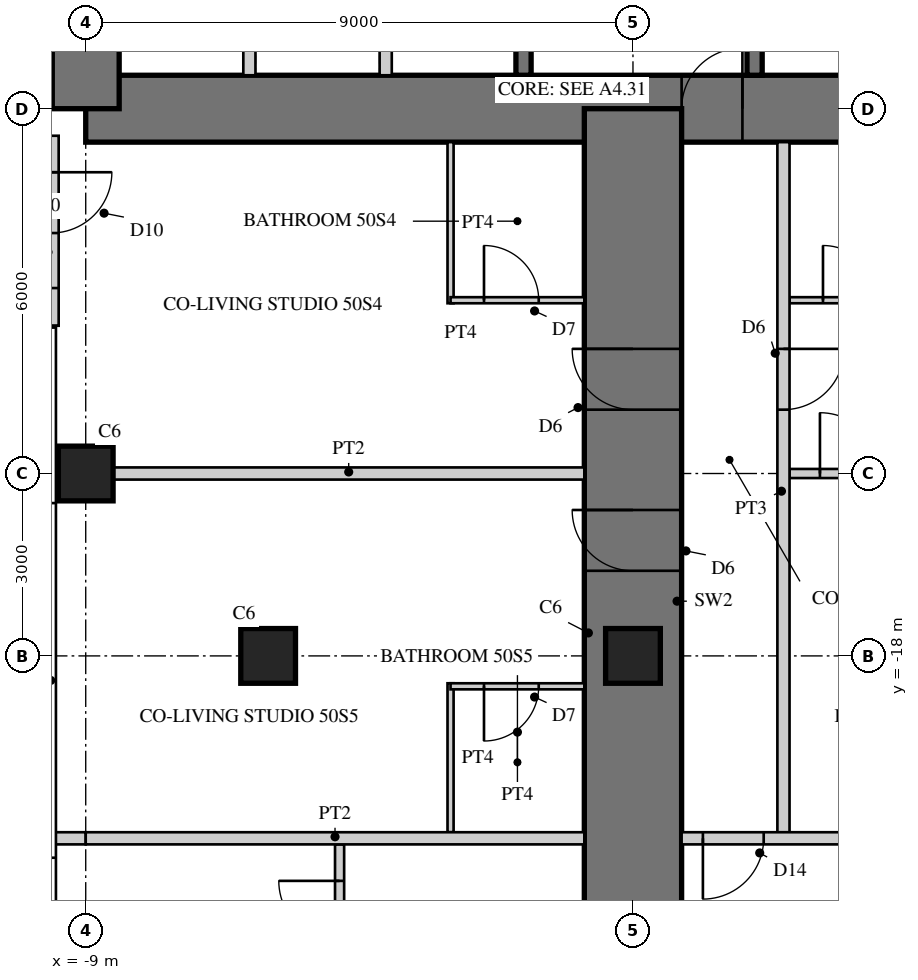
"""IFC4 building model, lengths in metres.
Left out: names, types, materials, properties, quantities, classifications, styles, units other than length and angle.
Written with IfcOpenShell. Run it as: python <this file> out.ifc"""

import sys

from ifc_helpers import new_model, si_unit, direction, frame, frame_2d, origin, origin_2d, place, context, subcontext, project, spatial, rectangle, hollow_rectangle, extrude, element, fill, save


model = new_model("IFC4")
c1 = context("Model", 3, precision=1e-05, world=origin(), true_north=direction((0.0, 1.0)))
c2 = subcontext(c1, "Body", "Model", "MODEL_VIEW")
j1 = project(units=[si_unit("LENGTHUNIT", "METRE"), si_unit("PLANEANGLEUNIT", "RADIAN")], contexts=[c1])
p1 = place(None, origin())
s1 = spatial("IfcSite", under=j1, at=p1, CompositionType="ELEMENT")
p2 = place(p1, origin())
s2 = spatial("IfcBuilding", under=s1, at=p2, CompositionType="ELEMENT")
p3 = place(p2, frame((0.0, 0.0, 200.1)))
s3 = spatial("IfcBuildingStorey", under=s2, at=p3, CompositionType="ELEMENT", Elevation=200.1)
p4 = place(p3, frame((-9.0, -9.0, 0.0), z_axis=(0.0, 0.0, 1.0), x_axis=(1.0, 0.0, 0.0)))
e1 = element("IfcWall", 1, at=p4, inside=s3, PredefinedType="SHEAR", context=c2, shape_type="SweptSolid", body=[
    extrude(rectangle(XDim=18.0, YDim=1.1, at=frame_2d((9.0, 0.0))), origin(), (0.0, 0.0, 1.0), 3.4),
])
p5 = place(p4, frame((9.8, 0.0, 0.0)))
e2 = element("IfcOpeningElement", 2, at=p5, cuts=e1, PredefinedType="OPENING", context=c2, shape_type="SweptSolid", body=[
    extrude(rectangle(XDim=1.0, YDim=2.4, at=frame_2d((0.5, 1.2))), frame((0.0, 0.56, 0.0), z_axis=(0.0, -1.0, 0.0), x_axis=(1.0, 0.0, 0.0)), (0.0, 0.0, 1.0), 1.12),
])
p6 = place(p3, frame((-9.0, 9.0, 0.0), z_axis=(0.0, 0.0, 1.0), x_axis=(0.0, -1.0, 0.0)))
e3 = element("IfcWall", 3, at=p6, inside=s3, PredefinedType="SHEAR", context=c2, shape_type="SweptSolid", body=[
    extrude(rectangle(XDim=18.0, YDim=1.1, at=frame_2d((9.0, 0.0))), origin(), (0.0, 0.0, 1.0), 3.4),
])
p7 = place(p6, frame((9.8, 0.0, 0.0)))
e4 = element("IfcOpeningElement", 4, at=p7, cuts=e3, PredefinedType="OPENING", context=c2, shape_type="SweptSolid", body=[
    extrude(rectangle(XDim=1.0, YDim=2.4, at=frame_2d((0.5, 1.2))), frame((0.0, 0.56, 0.0), z_axis=(0.0, -1.0, 0.0), x_axis=(1.0, 0.0, 0.0)), (0.0, 0.0, 1.0), 1.12),
])
p8 = place(p3, frame((-1.8, -1.875, 0.0), z_axis=(0.0, 0.0, 1.0), x_axis=(0.0, -1.0, 0.0)))
e5 = element("IfcWall", 5, at=p8, inside=s3, PredefinedType="SHEAR", context=c2, shape_type="SweptSolid", body=[
    extrude(rectangle(XDim=6.575, YDim=0.25, at=frame_2d((3.288, 0.0))), origin(), (0.0, 0.0, 1.0), 3.4),
])
p9 = place(p8, frame((1.875, 0.0, 0.0)))
e6 = element("IfcOpeningElement", 6, at=p9, cuts=e5, PredefinedType="OPENING", context=c2, shape_type="SweptSolid", body=[
    extrude(rectangle(XDim=1.6, YDim=2.4, at=frame_2d((0.8, 1.2))), frame((0.0, 0.135, 0.0), z_axis=(0.0, -1.0, 0.0), x_axis=(1.0, 0.0, 0.0)), (0.0, 0.0, 1.0), 0.27),
])
for number, where, z_axis, x_axis in (
    (7, (-4.067, -5.975, 0.0), (0.0, 0.0, 1.0), (0.0, -1.0, 0.0)),
    (8, (-6.308, -5.975, 0.0), (0.0, 0.0, 1.0), (0.0, -1.0, 0.0)),
):
    element("IfcWall", number, at=place(p3, frame(where, z_axis=z_axis, x_axis=x_axis)), inside=s3, PredefinedType="PARTITIONING", context=c2, shape_type="SweptSolid", body=[
        extrude(rectangle(XDim=2.475, YDim=0.2, at=frame_2d((1.237, 0.0))), origin(), (0.0, 0.0, 1.0), 3.4),
    ])
p10 = place(p3, frame((2.0, -1.675, 0.0), z_axis=(0.0, 0.0, 1.0), x_axis=(0.0, -1.0, 0.0)))
e9 = element("IfcWall", 9, at=p10, inside=s3, PredefinedType="SHEAR", context=c2, shape_type="SweptSolid", body=[
    extrude(rectangle(XDim=6.775, YDim=0.25, at=frame_2d((3.387, 0.0))), origin(), (0.0, 0.0, 1.0), 3.4),
])
p11 = place(p10, frame((0.725, 0.0, 0.0)))
e10 = element("IfcOpeningElement", 10, at=p11, cuts=e9, PredefinedType="OPENING", context=c2, shape_type="SweptSolid", body=[
    extrude(rectangle(XDim=1.0, YDim=2.1, at=frame_2d((0.5, 1.05))), frame((0.0, 0.135, 0.0), z_axis=(0.0, -1.0, 0.0), x_axis=(1.0, 0.0, 0.0)), (0.0, 0.0, 1.0), 0.27),
])
p12 = place(p3, frame((0.0, -9.0, 0.0), z_axis=(0.0, 0.0, 1.0), x_axis=(0.0, -1.0, 0.0)))
e11 = element("IfcWall", 11, at=p12, inside=s3, PredefinedType="SHEAR", context=c2, shape_type="SweptSolid", body=[
    extrude(rectangle(XDim=18.0, YDim=1.6, at=frame_2d((9.0, 0.0))), origin(), (0.0, 0.0, 1.0), 3.4),
])
p13 = place(p12, frame((3.95, 0.0, 0.0)))
e12 = element("IfcOpeningElement", 12, at=p13, cuts=e11, PredefinedType="OPENING", context=c2, shape_type="SweptSolid", body=[
    extrude(rectangle(XDim=1.0, YDim=2.15, at=frame_2d((0.5, 1.075))), frame((0.0, 0.81, 0.0), z_axis=(0.0, -1.0, 0.0), x_axis=(1.0, 0.0, 0.0)), (0.0, 0.0, 1.0), 1.62),
])
p14 = place(p12, frame((6.6, 0.0, 0.0)))
e13 = element("IfcOpeningElement", 13, at=p14, cuts=e11, PredefinedType="OPENING", context=c2, shape_type="SweptSolid", body=[
    extrude(rectangle(XDim=1.0, YDim=2.15, at=frame_2d((0.5, 1.075))), frame((0.0, 0.81, 0.0), z_axis=(0.0, -1.0, 0.0), x_axis=(1.0, 0.0, 0.0)), (0.0, 0.0, 1.0), 1.62),
])
p15 = place(p12, frame((13.25, 0.0, 0.0)))
e14 = element("IfcOpeningElement", 14, at=p15, cuts=e11, PredefinedType="OPENING", context=c2, shape_type="SweptSolid", body=[
    extrude(rectangle(XDim=1.0, YDim=2.2, at=frame_2d((0.5, 1.1))), frame((0.0, 0.81, 0.0), z_axis=(0.0, -1.0, 0.0), x_axis=(1.0, 0.0, 0.0)), (0.0, 0.0, 1.0), 1.62),
])
for number, where, z_axis, x_axis in (
    (15, (-9.0, -15.0, 0.0), (0.0, 0.0, 1.0), (1.0, 0.0, 0.0)),
    (16, (-6.0, -18.0, 0.0), (0.0, 0.0, 1.0), (1.0, 0.0, 0.0)),
    (17, (0.0, -18.0, 0.0), (0.0, 0.0, 1.0), (1.0, 0.0, 0.0)),
):
    element("IfcColumn", number, at=place(p3, frame(where, z_axis=z_axis, x_axis=x_axis)), inside=s3, PredefinedType="COLUMN", context=c2, shape_type="SweptSolid", body=[
        extrude(rectangle(XDim=0.9, YDim=0.9, at=origin_2d()), origin(), (0.0, 0.0, 1.0), 3.4),
    ])
p16 = place(p3, frame((-9.57, -9.445, 0.0), z_axis=(0.0, 0.0, 1.0), x_axis=(0.0, -1.0, 0.0)))
e18 = element("IfcWall", 18, at=p16, inside=s3, PredefinedType="SOLIDWALL", context=c2, shape_type="SweptSolid", body=[
    extrude(rectangle(XDim=3.125, YDim=0.25, at=frame_2d((1.562, 0.0))), origin(), (0.0, 0.0, 1.0), 3.22),
])
p17 = place(p16, frame((0.6, 0.0, 0.0)))
e19 = element("IfcOpeningElement", 19, at=p17, cuts=e18, PredefinedType="OPENING", context=c2, shape_type="SweptSolid", body=[
    extrude(rectangle(XDim=1.0, YDim=2.2, at=frame_2d((0.5, 1.1))), frame((0.0, 0.135, 0.0), z_axis=(0.0, -1.0, 0.0), x_axis=(1.0, 0.0, 0.0)), (0.0, 0.0, 1.0), 0.27),
])
p18 = place(p3, frame((2.575, -12.15, 0.0), z_axis=(0.0, 0.0, 1.0), x_axis=(1.0, 0.0, 0.0)))
e20 = element("IfcWall", 20, at=p18, inside=s3, PredefinedType="PARTITIONING", context=c2, shape_type="SweptSolid", body=[
    extrude(rectangle(XDim=2.2, YDim=0.1, at=frame_2d((1.1, 0.0))), origin(), (0.0, 0.0, 1.0), 3.22),
])
p19 = place(p18, frame((0.55, 0.0, 0.0)))
e21 = element("IfcOpeningElement", 21, at=p19, cuts=e20, PredefinedType="OPENING", context=c2, shape_type="SweptSolid", body=[
    extrude(rectangle(XDim=0.9, YDim=2.1, at=frame_2d((0.45, 1.05))), frame((0.0, 0.06, 0.0), z_axis=(0.0, -1.0, 0.0), x_axis=(1.0, 0.0, 0.0)), (0.0, 0.0, 1.0), 0.12),
])
p20 = place(p3, frame((2.575, -15.0, 0.0), z_axis=(0.0, 0.0, 1.0), x_axis=(1.0, 0.0, 0.0)))
e22 = element("IfcWall", 22, at=p20, inside=s3, PredefinedType="PARTITIONING", context=c2, shape_type="SweptSolid", body=[
    extrude(rectangle(XDim=5.975, YDim=0.15, at=frame_2d((2.988, 0.0))), origin(), (0.0, 0.0, 1.0), 2.47),
])
p21 = place(p20, frame((0.5, 0.0, 0.0)))
e23 = element("IfcOpeningElement", 23, at=p21, cuts=e22, PredefinedType="OPENING", context=c2, shape_type="SweptSolid", body=[
    extrude(rectangle(XDim=1.0, YDim=2.1, at=frame_2d((0.5, 1.05))), frame((0.0, 0.085, 0.0), z_axis=(0.0, -1.0, 0.0), x_axis=(1.0, 0.0, 0.0)), (0.0, 0.0, 1.0), 0.17),
])
p22 = place(p3, frame((-3.0, -9.55, 0.0), z_axis=(0.0, 0.0, 1.0), x_axis=(0.0, -1.0, 0.0)))
e24 = element("IfcWall", 24, at=p22, inside=s3, PredefinedType="PARTITIONING", context=c2, shape_type="SweptSolid", body=[
    extrude(rectangle(XDim=2.65, YDim=0.1, at=frame_2d((1.325, 0.0))), origin(), (0.0, 0.0, 1.0), 3.22),
])
p23 = place(p3, frame((-3.0, -12.15, 0.0), z_axis=(0.0, 0.0, 1.0), x_axis=(1.0, 0.0, 0.0)))
e25 = element("IfcWall", 25, at=p23, inside=s3, PredefinedType="PARTITIONING", context=c2, shape_type="SweptSolid", body=[
    extrude(rectangle(XDim=2.2, YDim=0.1, at=frame_2d((1.1, 0.0))), origin(), (0.0, 0.0, 1.0), 3.22),
])
p24 = place(p23, frame((0.55, 0.0, 0.0)))
e26 = element("IfcOpeningElement", 26, at=p24, cuts=e25, PredefinedType="OPENING", context=c2, shape_type="SweptSolid", body=[
    extrude(rectangle(XDim=0.9, YDim=2.1, at=frame_2d((0.45, 1.05))), frame((0.0, 0.06, 0.0), z_axis=(0.0, -1.0, 0.0), x_axis=(1.0, 0.0, 0.0)), (0.0, 0.0, 1.0), 0.12),
])
p25 = place(p3, frame((-8.55, -15.0, 0.0), z_axis=(0.0, 0.0, 1.0), x_axis=(1.0, 0.0, 0.0)))
e27 = element("IfcWall", 27, at=p25, inside=s3, PredefinedType="SOLIDWALL", context=c2, shape_type="SweptSolid", body=[
    extrude(rectangle(XDim=7.75, YDim=0.2, at=frame_2d((3.875, 0.0))), origin(), (0.0, 0.0, 1.0), 2.47),
])
p26 = place(p3, frame((-3.0, -18.45, 0.0), z_axis=(0.0, 0.0, 1.0), x_axis=(0.0, -1.0, 0.0)))
e28 = element("IfcWall", 28, at=p26, inside=s3, PredefinedType="PARTITIONING", context=c2, shape_type="SweptSolid", body=[
    extrude(rectangle(XDim=2.45, YDim=0.1, at=frame_2d((1.225, 0.0))), origin(), (0.0, 0.0, 1.0), 3.22),
])
p27 = place(p3, frame((-3.0, -18.5, 0.0), z_axis=(0.0, 0.0, 1.0), x_axis=(1.0, 0.0, 0.0)))
e29 = element("IfcWall", 29, at=p27, inside=s3, PredefinedType="PARTITIONING", context=c2, shape_type="SweptSolid", body=[
    extrude(rectangle(XDim=2.2, YDim=0.1, at=frame_2d((1.1, 0.0))), origin(), (0.0, 0.0, 1.0), 3.22),
])
p28 = place(p27, frame((0.55, 0.0, 0.0)))
e30 = element("IfcOpeningElement", 30, at=p28, cuts=e29, PredefinedType="OPENING", context=c2, shape_type="SweptSolid", body=[
    extrude(rectangle(XDim=0.9, YDim=2.1, at=frame_2d((0.45, 1.05))), frame((0.0, 0.06, 0.0), z_axis=(0.0, -1.0, 0.0), x_axis=(1.0, 0.0, 0.0)), (0.0, 0.0, 1.0), 0.12),
])
p29 = place(p3, frame((2.475, -9.55, 0.0), z_axis=(0.0, 0.0, 1.0), x_axis=(0.0, -1.0, 0.0)))
e31 = element("IfcWall", 31, at=p29, inside=s3, PredefinedType="SOLIDWALL", context=c2, shape_type="SweptSolid", body=[
    extrude(rectangle(XDim=11.45, YDim=0.2, at=frame_2d((5.725, 0.0))), origin(), (0.0, 0.0, 1.0), 3.22),
])
p30 = place(p29, frame((3.4, 0.0, 0.0)))
e32 = element("IfcOpeningElement", 32, at=p30, cuts=e31, PredefinedType="OPENING", context=c2, shape_type="SweptSolid", body=[
    extrude(rectangle(XDim=1.0, YDim=2.15, at=frame_2d((0.5, 1.075))), frame((0.0, 0.11, 0.0), z_axis=(0.0, -1.0, 0.0), x_axis=(1.0, 0.0, 0.0)), (0.0, 0.0, 1.0), 0.22),
])
p31 = place(p3, frame((-4.825, -21.1, 0.0), z_axis=(0.0, 0.0, 1.0), x_axis=(0.0, -1.0, 0.0)))
e33 = element("IfcWall", 33, at=p31, inside=s3, PredefinedType="PARTITIONING", context=c2, shape_type="SweptSolid", body=[
    extrude(rectangle(XDim=5.45, YDim=0.15, at=frame_2d((2.725, 0.0))), origin(), (0.0, 0.0, 1.0), 3.22),
])
p32 = place(p31, frame((0.6, 0.0, 0.0)))
e34 = element("IfcOpeningElement", 34, at=p32, cuts=e33, PredefinedType="OPENING", context=c2, shape_type="SweptSolid", body=[
    extrude(rectangle(XDim=1.0, YDim=2.1, at=frame_2d((0.5, 1.05))), frame((0.0, 0.085, 0.0), z_axis=(0.0, -1.0, 0.0), x_axis=(1.0, 0.0, 0.0)), (0.0, 0.0, 1.0), 0.17),
])
p33 = place(p3, frame((-9.53, -21.0, 0.0), z_axis=(0.0, 0.0, 1.0), x_axis=(1.0, 0.0, 0.0)))
e35 = element("IfcWall", 35, at=p33, inside=s3, PredefinedType="SOLIDWALL", context=c2, shape_type="SweptSolid", body=[
    extrude(rectangle(XDim=0.53, YDim=0.2, at=frame_2d((0.265, 0.0))), origin(), (0.0, 0.0, 1.0), 3.22),
])
p34 = place(p3, frame((-9.0, -21.0, 0.0), z_axis=(0.0, 0.0, 1.0), x_axis=(1.0, 0.0, 0.0)))
e36 = element("IfcWall", 36, at=p34, inside=s3, PredefinedType="SOLIDWALL", context=c2, shape_type="SweptSolid", body=[
    extrude(rectangle(XDim=8.2, YDim=0.2, at=frame_2d((4.1, 0.0))), origin(), (0.0, 0.0, 1.0), 2.62),
])
p35 = place(p3, frame((0.8, -21.0, 0.0), z_axis=(0.0, 0.0, 1.0), x_axis=(1.0, 0.0, 0.0)))
e37 = element("IfcWall", 37, at=p35, inside=s3, PredefinedType="SOLIDWALL", context=c2, shape_type="SweptSolid", body=[
    extrude(rectangle(XDim=8.2, YDim=0.2, at=frame_2d((4.1, 0.0))), origin(), (0.0, 0.0, 1.0), 2.62),
])
p36 = place(p35, frame((0.35, 0.0, 0.0)))
e38 = element("IfcOpeningElement", 38, at=p36, cuts=e37, PredefinedType="OPENING", context=c2, shape_type="SweptSolid", body=[
    extrude(rectangle(XDim=1.0, YDim=2.2, at=frame_2d((0.5, 1.1))), frame((0.0, 0.11, 0.0), z_axis=(0.0, -1.0, 0.0), x_axis=(1.0, 0.0, 0.0)), (0.0, 0.0, 1.0), 0.22),
])
p37 = place(p17, origin())
e39 = element("IfcDoor", 39, at=p37, inside=s3, OperationType="SINGLE_SWING_LEFT", PredefinedType="DOOR", context=c2, shape_type="SweptSolid", body=[
    extrude(hollow_rectangle(XDim=1.0, YDim=2.2, WallThickness=0.06, at=frame_2d((0.5, 1.1))), frame((0.0, 0.025, 0.0), z_axis=(0.0, -1.0, 0.0), x_axis=(1.0, 0.0, 0.0)), (0.0, 0.0, 1.0), 0.05),
    extrude(rectangle(XDim=0.879, YDim=2.079, at=frame_2d((0.5, 1.1))), frame((0.0, 0.025, 0.0), z_axis=(0.0, -1.0, 0.0), x_axis=(1.0, 0.0, 0.0)), (0.0, 0.0, 1.0), 0.05),
])
fill(e19, e39)
p38 = place(p19, origin())
e40 = element("IfcDoor", 40, at=p38, inside=s3, OperationType="SINGLE_SWING_LEFT", PredefinedType="DOOR", context=c2, shape_type="SweptSolid", body=[
    extrude(rectangle(XDim=0.9, YDim=2.1, at=frame_2d((0.45, 1.05))), frame((0.0, 0.025, 0.0), z_axis=(0.0, -1.0, 0.0), x_axis=(1.0, 0.0, 0.0)), (0.0, 0.0, 1.0), 0.05),
])
fill(e21, e40)
p39 = place(p21, origin())
e41 = element("IfcDoor", 41, at=p39, inside=s3, OperationType="SINGLE_SWING_LEFT", PredefinedType="DOOR", context=c2, shape_type="SweptSolid", body=[
    extrude(rectangle(XDim=1.0, YDim=2.1, at=frame_2d((0.5, 1.05))), frame((0.0, 0.025, 0.0), z_axis=(0.0, -1.0, 0.0), x_axis=(1.0, 0.0, 0.0)), (0.0, 0.0, 1.0), 0.05),
])
fill(e23, e41)
p40 = place(p24, origin())
e42 = element("IfcDoor", 42, at=p40, inside=s3, OperationType="SINGLE_SWING_LEFT", PredefinedType="DOOR", context=c2, shape_type="SweptSolid", body=[
    extrude(rectangle(XDim=0.9, YDim=2.1, at=frame_2d((0.45, 1.05))), frame((0.0, 0.025, 0.0), z_axis=(0.0, -1.0, 0.0), x_axis=(1.0, 0.0, 0.0)), (0.0, 0.0, 1.0), 0.05),
])
fill(e26, e42)
p41 = place(p28, frame((0.9, 0.0, 0.0), z_axis=(0.0, 0.0, 1.0), x_axis=(-1.0, 0.0, 0.0)))
e43 = element("IfcDoor", 43, at=p41, inside=s3, OperationType="SINGLE_SWING_RIGHT", PredefinedType="DOOR", context=c2, shape_type="SweptSolid", body=[
    extrude(rectangle(XDim=0.9, YDim=2.1, at=frame_2d((0.45, 1.05))), frame((0.0, 0.025, 0.0), z_axis=(0.0, -1.0, 0.0), x_axis=(1.0, 0.0, 0.0)), (0.0, 0.0, 1.0), 0.05),
])
fill(e30, e43)
p42 = place(p30, origin())
e44 = element("IfcDoor", 44, at=p42, inside=s3, OperationType="SINGLE_SWING_LEFT", PredefinedType="DOOR", context=c2, shape_type="SweptSolid", body=[
    extrude(rectangle(XDim=1.0, YDim=2.15, at=frame_2d((0.5, 1.075))), frame((0.0, 0.025, 0.0), z_axis=(0.0, -1.0, 0.0), x_axis=(1.0, 0.0, 0.0)), (0.0, 0.0, 1.0), 0.05),
])
fill(e32, e44)
p43 = place(p32, frame((1.0, 0.0, 0.0), z_axis=(0.0, 0.0, 1.0), x_axis=(-1.0, 0.0, 0.0)))
e45 = element("IfcDoor", 45, at=p43, inside=s3, OperationType="SINGLE_SWING_RIGHT", PredefinedType="DOOR", context=c2, shape_type="SweptSolid", body=[
    extrude(rectangle(XDim=1.0, YDim=2.1, at=frame_2d((0.5, 1.05))), frame((0.0, 0.025, 0.0), z_axis=(0.0, -1.0, 0.0), x_axis=(1.0, 0.0, 0.0)), (0.0, 0.0, 1.0), 0.05),
])
fill(e34, e45)
p44 = place(p36, frame((1.0, 0.0, 0.0), z_axis=(0.0, 0.0, 1.0), x_axis=(-1.0, 0.0, 0.0)))
e46 = element("IfcDoor", 46, at=p44, inside=s3, OperationType="SINGLE_SWING_RIGHT", PredefinedType="DOOR", context=c2, shape_type="SweptSolid", body=[
    extrude(rectangle(XDim=1.0, YDim=2.2, at=frame_2d((0.5, 1.1))), frame((0.0, 0.025, 0.0), z_axis=(0.0, -1.0, 0.0), x_axis=(1.0, 0.0, 0.0)), (0.0, 0.0, 1.0), 0.05),
])
fill(e38, e46)
p45 = place(p13, frame((1.0, 0.0, 0.0), z_axis=(0.0, 0.0, 1.0), x_axis=(-1.0, 0.0, 0.0)))
e47 = element("IfcDoor", 47, at=p45, inside=s3, OperationType="SINGLE_SWING_RIGHT", PredefinedType="DOOR", context=c2, shape_type="SweptSolid", body=[
    extrude(rectangle(XDim=1.0, YDim=2.15, at=frame_2d((0.5, 1.075))), frame((0.0, 0.025, 0.0), z_axis=(0.0, -1.0, 0.0), x_axis=(1.0, 0.0, 0.0)), (0.0, 0.0, 1.0), 0.05),
])
fill(e12, e47)
p46 = place(p14, frame((1.0, 0.0, 0.0), z_axis=(0.0, 0.0, 1.0), x_axis=(-1.0, 0.0, 0.0)))
e48 = element("IfcDoor", 48, at=p46, inside=s3, OperationType="SINGLE_SWING_RIGHT", PredefinedType="DOOR", context=c2, shape_type="SweptSolid", body=[
    extrude(rectangle(XDim=1.0, YDim=2.15, at=frame_2d((0.5, 1.075))), frame((0.0, 0.025, 0.0), z_axis=(0.0, -1.0, 0.0), x_axis=(1.0, 0.0, 0.0)), (0.0, 0.0, 1.0), 0.05),
])
fill(e13, e48)
p47 = place(p5, origin())
e49 = element("IfcDoor", 49, at=p47, inside=s3, OperationType="SINGLE_SWING_RIGHT", PredefinedType="DOOR", context=c2, shape_type="SweptSolid", body=[
    extrude(rectangle(XDim=1.0, YDim=2.4, at=frame_2d((0.5, 1.2))), frame((0.0, 0.055, 0.0), z_axis=(0.0, -1.0, 0.0), x_axis=(1.0, 0.0, 0.0)), (0.0, 0.0, 1.0), 0.05),
])
fill(e2, e49)
save(model, sys.argv[1])
